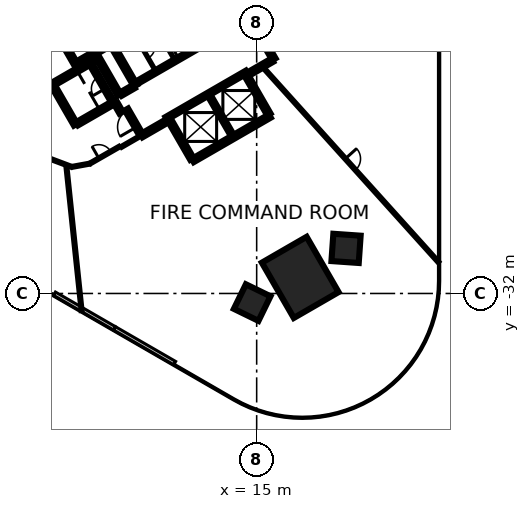
"""IFC4 building model, lengths in metres.
Left out: names, types, materials, properties, quantities, classifications, styles, units other than length and angle.
Written with IfcOpenShell. Run it as: python <this file> out.ifc"""

import sys

from ifc_helpers import new_model, si_unit, direction, frame, frame_2d, origin, origin_2d, place, context, subcontext, project, spatial, polyline, rectangle, outline, extrude, element, fill, save


model = new_model("IFC4")
c1 = context("Model", 3, precision=1e-05, world=origin(), true_north=direction((0.0, 1.0)))
c2 = subcontext(c1, "Body", "Model", "MODEL_VIEW")
j1 = project(units=[si_unit("LENGTHUNIT", "METRE"), si_unit("PLANEANGLEUNIT", "RADIAN")], contexts=[c1])
p1 = place(None, origin())
s1 = spatial("IfcSite", under=j1, at=p1, CompositionType="ELEMENT")
p2 = place(p1, origin())
s2 = spatial("IfcBuilding", under=s1, at=p2, CompositionType="ELEMENT")
p3 = place(p2, origin())
s3 = spatial("IfcBuildingStorey", under=s2, at=p3, CompositionType="ELEMENT", Elevation=0.0)
p4 = place(p3, frame((17.865, -30.942, -0.45), z_axis=(0.0, 0.0, 1.0), x_axis=(-0.5, 0.866025403784, 0.0)))
e1 = element("IfcColumn", 1, at=p4, inside=s3, PredefinedType="COLUMN", context=c2, shape_type="SweptSolid", body=[
    extrude(rectangle(XDim=4.2, YDim=3.4, at=origin_2d()), origin(), (0.0, 0.0, 1.0), 7.55),
])
for number, where, z_axis, x_axis in (
    (2, (20.879, -29.034, -0.45), (0.0, 0.0, 1.0), (-0.998, 0.07, 0.0)),
    (3, (14.705, -32.599, -0.45), (0.0, 0.0, 1.0), (0.438, 0.899, 0.0)),
):
    element("IfcColumn", number, at=place(p3, frame(where, z_axis=z_axis, x_axis=x_axis)), inside=s3, PredefinedType="COLUMN", context=c2, shape_type="SweptSolid", body=[
        extrude(rectangle(XDim=1.8, YDim=1.8, at=origin_2d()), origin(), (0.0, 0.0, 1.0), 5.15),
    ])
p5 = place(p3, frame((5.653, -34.297, 0.0), z_axis=(0.0, 0.0, 1.0), x_axis=(-0.866010176527, 0.500026373457, 0.0)))
e4 = element("IfcWall", 4, at=p5, inside=s3, PredefinedType="SOLIDWALL", context=c2, shape_type="SweptSolid", body=[
    extrude(rectangle(XDim=4.566, YDim=0.25, at=frame_2d((2.283, 0.0))), origin(), (0.0, 0.0, 1.0), 7.1),
])
p6 = place(p3, frame((9.608, -36.58, 0.0), z_axis=(0.0, 0.0, 1.0), x_axis=(-0.866023543838, 0.500003221507, 0.0)))
e5 = element("IfcWall", 5, at=p6, inside=s3, PredefinedType="SOLIDWALL", context=c2, shape_type="SweptSolid", body=[
    extrude(rectangle(XDim=4.566, YDim=0.25, at=frame_2d((2.283, 0.0))), origin(), (0.0, 0.0, 1.0), 7.1),
])
p7 = place(p3, origin())
e6 = element("IfcWall", 6, at=p7, inside=s3, PredefinedType="SOLIDWALL", context=c2, shape_type="SweptSolid", body=[
    extrude(outline(polyline([(13.5, -38.971), (14.556, -39.492), (15.671, -39.87), (16.244, -40.004), (17.411, -40.158), (18.589, -40.158), (19.175, -40.1), (20.329, -39.87), (21.444, -39.492), (22.5, -38.971), (23.0, -38.66), (23.479, -38.317), (24.364, -37.541), (25.14, -36.656), (25.483, -36.177), (26.072, -35.157), (26.522, -34.07), (26.827, -32.933), (26.981, -31.766), (27.0, -31.177), (26.75, -31.169), (26.731, -31.745), (26.581, -32.884), (26.285, -33.989), (25.847, -35.047), (25.273, -36.042), (24.944, -36.5), (24.187, -37.364), (23.323, -38.121), (22.861, -38.452), (22.378, -38.752), (21.348, -39.26), (20.265, -39.628), (19.138, -39.852), (18.576, -39.908), (17.428, -39.908), (16.289, -39.758), (15.739, -39.63), (14.652, -39.26), (13.611, -38.747), (13.5, -38.971)])), origin(), (0.0, 0.0, 1.0), 7.1),
])
p8 = place(p3, frame((13.008, -11.181, 0.0), z_axis=(0.0, 0.0, 1.0), x_axis=(0.500004234368, -0.866022959057, 0.0)))
e7 = element("IfcWall", 7, at=p8, inside=s3, PredefinedType="SHEAR", context=c2, shape_type="SweptSolid", body=[
    extrude(rectangle(XDim=6.25, YDim=0.25, at=frame_2d((3.125, 0.0))), origin(), (0.0, 0.0, 1.0), 7.1),
])
p9 = place(p3, frame((15.865, -20.328, 0.0), z_axis=(0.0, 0.0, 1.0), x_axis=(-0.86602852612, -0.499994591916, 0.0)))
e8 = element("IfcWall", 8, at=p9, inside=s3, PredefinedType="SHEAR", context=c2, shape_type="SweptSolid", body=[
    extrude(rectangle(XDim=5.85, YDim=0.25, at=frame_2d((2.925, 0.0))), origin(), (0.0, 0.0, 1.0), 7.1),
])
p10 = place(p3, frame((3.235, -17.153, 0.0), z_axis=(0.0, 0.0, 1.0), x_axis=(-0.500008851346, 0.866020293397, 0.0)))
e9 = element("IfcWall", 9, at=p10, inside=s3, PredefinedType="SHEAR", context=c2, shape_type="SweptSolid", body=[
    extrude(rectangle(XDim=5.51, YDim=0.25, at=frame_2d((2.755, 0.0))), origin(), (0.0, 0.0, 1.0), 7.1),
])
p11 = place(p3, frame((7.031, -18.327, 0.0), z_axis=(0.0, 0.0, 1.0), x_axis=(-0.499971222258, 0.866042017984, 0.0)))
e10 = element("IfcWall", 10, at=p11, inside=s3, PredefinedType="SHEAR", context=c2, shape_type="SweptSolid", body=[
    extrude(rectangle(XDim=3.2, YDim=0.25, at=frame_2d((1.6, 0.0))), origin(), (0.0, 0.0, 1.0), 7.1),
])
for number, where, z_axis, x_axis in (
    (11, (14.315, -17.644, 0.0), (0.0, 0.0, 1.0), (0.5, -0.866, 0.0)),
    (12, (10.736, -23.145, 0.0), (0.0, 0.0, 1.0), (-0.5, 0.866, 0.0)),
):
    element("IfcWall", number, at=place(p3, frame(where, z_axis=z_axis, x_axis=x_axis)), inside=s3, PredefinedType="SHEAR", context=c2, shape_type="SweptSolid", body=[
        extrude(rectangle(XDim=2.974, YDim=0.25, at=frame_2d((1.487, 0.0))), origin(), (0.0, 0.0, 1.0), 7.1),
    ])
p12 = place(p3, frame((3.085, -20.894, 0.0), z_axis=(0.0, 0.0, 1.0), x_axis=(-0.499978833458, 0.866037623948, 0.0)))
e13 = element("IfcWall", 13, at=p12, inside=s3, PredefinedType="SHEAR", context=c2, shape_type="SweptSolid", body=[
    extrude(rectangle(XDim=3.05, YDim=0.25, at=frame_2d((1.525, 0.0))), origin(), (0.0, 0.0, 1.0), 7.1),
])
p13 = place(p3, frame((1.669, -18.19, 0.0), z_axis=(0.0, 0.0, 1.0), x_axis=(0.866042235819, 0.499970844928, 0.0)))
e14 = element("IfcWall", 14, at=p13, inside=s3, PredefinedType="SHEAR", context=c2, shape_type="SweptSolid", body=[
    extrude(rectangle(XDim=2.865, YDim=0.25, at=frame_2d((1.432, 0.0))), origin(), (0.0, 0.0, 1.0), 7.1),
])
p14 = place(p3, frame((5.675, -19.399, 0.0), z_axis=(0.0, 0.0, 1.0), x_axis=(-0.866026637627, -0.499997862916, 0.0)))
e15 = element("IfcWall", 15, at=p14, inside=s3, PredefinedType="SHEAR", context=c2, shape_type="SweptSolid", body=[
    extrude(rectangle(XDim=2.865, YDim=0.25, at=frame_2d((1.432, 0.0))), origin(), (0.0, 0.0, 1.0), 7.1),
])
p15 = place(p3, frame((4.414, -16.276, 0.0), z_axis=(0.0, 0.0, 1.0), x_axis=(0.500003324108, -0.866023484601, 0.0)))
e16 = element("IfcWall", 16, at=p15, inside=s3, PredefinedType="SHEAR", context=c2, shape_type="SweptSolid", body=[
    extrude(rectangle(XDim=3.085, YDim=0.25, at=frame_2d((1.542, 0.0))), origin(), (0.0, 0.0, 1.0), 7.1),
])
p16 = place(p3, frame((5.322, -15.619, 0.0), z_axis=(0.0, 0.0, 1.0), x_axis=(-0.866026229868, -0.499998569178, 0.0)))
e17 = element("IfcWall", 17, at=p16, inside=s3, PredefinedType="SHEAR", context=c2, shape_type="SweptSolid", body=[
    extrude(rectangle(XDim=2.449, YDim=0.25, at=frame_2d((1.225, 0.0))), origin(), (0.0, 0.0, 1.0), 7.1),
])
p17 = place(p3, frame((9.14, -20.631, 0.0), z_axis=(0.0, 0.0, 1.0), x_axis=(-0.866043531843, -0.499968599967, 0.0)))
e18 = element("IfcWall", 18, at=p17, inside=s3, PredefinedType="SHEAR", context=c2, shape_type="SweptSolid", body=[
    extrude(rectangle(XDim=1.975, YDim=0.25, at=frame_2d((0.987, 0.0))), origin(), (0.0, 0.0, 1.0), 7.1),
])
p18 = place(p3, frame((16.025, -16.656, 0.0), z_axis=(0.0, 0.0, 1.0), x_axis=(-0.866016279763, -0.500015802937, 0.0)))
e19 = element("IfcWall", 19, at=p18, inside=s3, PredefinedType="SHEAR", context=c2, shape_type="SweptSolid", body=[
    extrude(rectangle(XDim=1.849, YDim=0.25, at=frame_2d((0.925, 0.0))), origin(), (0.0, 0.0, 1.0), 7.1),
])
p19 = place(p3, frame((7.367, -21.51, 0.0), z_axis=(0.0, 0.0, 1.0), x_axis=(-0.499983108224, 0.866035156036, 0.0)))
e20 = element("IfcWall", 20, at=p19, inside=s3, PredefinedType="SHEAR", context=c2, shape_type="SweptSolid", body=[
    extrude(rectangle(XDim=1.865, YDim=0.25, at=frame_2d((0.932, 0.0))), origin(), (0.0, 0.0, 1.0), 7.1),
])
p20 = place(p19, frame((0.535, 0.0, 0.0)))
e21 = element("IfcOpeningElement", 21, at=p20, cuts=e20, PredefinedType="OPENING", context=c2, shape_type="SweptSolid", body=[
    extrude(rectangle(XDim=1.25, YDim=2.1, at=frame_2d((0.625, 1.05))), frame((0.0, 0.135, 0.0), z_axis=(0.0, -1.0, 0.0), x_axis=(1.0, 0.0, 0.0)), (0.0, 0.0, 1.0), 0.27),
])
p21 = place(p3, frame((6.065, -18.885, 0.0), z_axis=(0.0, 0.0, 1.0), x_axis=(0.866017078145, 0.500014420154, 0.0)))
e22 = element("IfcWall", 22, at=p21, inside=s3, PredefinedType="SHEAR", context=c2, shape_type="SweptSolid", body=[
    extrude(rectangle(XDim=0.989, YDim=0.25, at=frame_2d((0.495, 0.0))), origin(), (0.0, 0.0, 1.0), 7.1),
])
p22 = place(p3, frame((6.08, -20.1, 0.0), z_axis=(0.0, 0.0, 1.0), x_axis=(-0.500051773299, 0.865995510393, 0.0)))
e23 = element("IfcWall", 23, at=p22, inside=s3, PredefinedType="SHEAR", context=c2, shape_type="SweptSolid", body=[
    extrude(rectangle(XDim=0.685, YDim=0.25, at=frame_2d((0.342, 0.0))), origin(), (0.0, 0.0, 1.0), 7.1),
])
p23 = place(p3, frame((4.145, -16.749, 0.0), z_axis=(0.0, 0.0, 1.0), x_axis=(0.866185586049, 0.49972245349, 0.0)))
e24 = element("IfcWall", 24, at=p23, inside=s3, PredefinedType="SHEAR", context=c2, shape_type="SweptSolid", body=[
    extrude(rectangle(XDim=0.344, YDim=0.25, at=frame_2d((0.172, 0.0))), origin(), (0.0, 0.0, 1.0), 7.1),
])
p24 = place(p3, frame((9.052, -20.48, 0.0), z_axis=(0.0, 0.0, 1.0), x_axis=(0.866030299012, 0.499991521122, 0.0)))
e25 = element("IfcWall", 25, at=p24, inside=s3, PredefinedType="SHEAR", context=c2, shape_type="SweptSolid", body=[
    extrude(rectangle(XDim=6.1, YDim=0.2, at=frame_2d((3.05, 0.0))), origin(), (0.0, 0.0, 1.0), 7.1),
])
p25 = place(p24, frame((1.0, 0.0, 0.0)))
e26 = element("IfcOpeningElement", 26, at=p25, cuts=e25, PredefinedType="OPENING", context=c2, shape_type="SweptSolid", body=[
    extrude(rectangle(XDim=1.2, YDim=2.1, at=frame_2d((0.6, 1.05))), frame((0.0, 0.11, 0.0), z_axis=(0.0, -1.0, 0.0), x_axis=(1.0, 0.0, 0.0)), (0.0, 0.0, 1.0), 0.22),
])
p26 = place(p24, frame((4.05, 0.0, 0.0)))
e27 = element("IfcOpeningElement", 27, at=p26, cuts=e25, PredefinedType="OPENING", context=c2, shape_type="SweptSolid", body=[
    extrude(rectangle(XDim=1.2, YDim=2.1, at=frame_2d((0.6, 1.05))), frame((0.0, 0.11, 0.0), z_axis=(0.0, -1.0, 0.0), x_axis=(1.0, 0.0, 0.0)), (0.0, 0.0, 1.0), 0.22),
])
p27 = place(p3, frame((7.077, -18.156, 0.0), z_axis=(0.0, 0.0, 1.0), x_axis=(0.866038630372, 0.499977090179, 0.0)))
e28 = element("IfcWall", 28, at=p27, inside=s3, PredefinedType="SHEAR", context=c2, shape_type="SweptSolid", body=[
    extrude(rectangle(XDim=5.699, YDim=0.2, at=frame_2d((2.85, 0.0))), origin(), (0.0, 0.0, 1.0), 7.1),
])
p28 = place(p27, frame((3.224, 0.0, 0.0)))
e29 = element("IfcOpeningElement", 29, at=p28, cuts=e28, PredefinedType="OPENING", context=c2, shape_type="SweptSolid", body=[
    extrude(rectangle(XDim=0.9, YDim=2.1, at=frame_2d((0.45, 1.05))), frame((0.0, 0.11, 0.0), z_axis=(0.0, -1.0, 0.0), x_axis=(1.0, 0.0, 0.0)), (0.0, 0.0, 1.0), 0.22),
])
p29 = place(p27, frame((4.599, 0.0, 0.0)))
e30 = element("IfcOpeningElement", 30, at=p29, cuts=e28, PredefinedType="OPENING", context=c2, shape_type="SweptSolid", body=[
    extrude(rectangle(XDim=0.9, YDim=2.1, at=frame_2d((0.45, 1.05))), frame((0.0, 0.11, 0.0), z_axis=(0.0, -1.0, 0.0), x_axis=(1.0, 0.0, 0.0)), (0.0, 0.0, 1.0), 0.22),
])
p30 = place(p3, frame((11.875, -18.967, 0.0), z_axis=(0.0, 0.0, 1.0), x_axis=(0.49998131003, -0.866036194175, 0.0)))
e31 = element("IfcWall", 31, at=p30, inside=s3, PredefinedType="SHEAR", context=c2, shape_type="SweptSolid", body=[
    extrude(rectangle(XDim=3.048, YDim=0.2, at=frame_2d((1.524, 0.0))), origin(), (0.0, 0.0, 1.0), 7.1),
])
p31 = place(p3, frame((5.503, -19.352, 0.0), z_axis=(0.0, 0.0, 1.0), x_axis=(-0.499986818241, 0.866033014143, 0.0)))
e32 = element("IfcWall", 32, at=p31, inside=s3, PredefinedType="SHEAR", context=c2, shape_type="SweptSolid", body=[
    extrude(rectangle(XDim=2.798, YDim=0.2, at=frame_2d((1.399, 0.0))), origin(), (0.0, 0.0, 1.0), 7.1),
])
p32 = place(p31, frame((0.949, 0.0, 0.0)))
e33 = element("IfcOpeningElement", 33, at=p32, cuts=e32, PredefinedType="OPENING", context=c2, shape_type="SweptSolid", body=[
    extrude(rectangle(XDim=0.9, YDim=2.1, at=frame_2d((0.45, 1.05))), frame((0.0, 0.11, 0.0), z_axis=(0.0, -1.0, 0.0), x_axis=(1.0, 0.0, 0.0)), (0.0, 0.0, 1.0), 0.22),
])
p33 = place(p3, frame((8.207, -14.214, 0.0), z_axis=(0.0, 0.0, 1.0), x_axis=(0.50002746344, -0.86600954718, 0.0)))
e34 = element("IfcWall", 34, at=p33, inside=s3, PredefinedType="PARTITIONING", context=c2, shape_type="SweptSolid", body=[
    extrude(rectangle(XDim=2.748, YDim=0.15, at=frame_2d((1.374, 0.0))), origin(), (0.0, 0.0, 1.0), 7.1),
])
p34 = place(p33, frame((0.924, 0.0, 0.0)))
e35 = element("IfcOpeningElement", 35, at=p34, cuts=e34, PredefinedType="OPENING", context=c2, shape_type="SweptSolid", body=[
    extrude(rectangle(XDim=0.9, YDim=2.1, at=frame_2d((0.45, 1.05))), frame((0.0, 0.085, 0.0), z_axis=(0.0, -1.0, 0.0), x_axis=(1.0, 0.0, 0.0)), (0.0, 0.0, 1.0), 0.17),
])
p35 = place(p3, frame((6.951, -14.939, 0.0), z_axis=(0.0, 0.0, 1.0), x_axis=(0.499988999718, -0.866031754707, 0.0)))
e36 = element("IfcWall", 36, at=p35, inside=s3, PredefinedType="PARTITIONING", context=c2, shape_type="SweptSolid", body=[
    extrude(rectangle(XDim=2.749, YDim=0.15, at=frame_2d((1.374, 0.0))), origin(), (0.0, 0.0, 1.0), 7.1),
])
p36 = place(p35, frame((0.924, 0.0, 0.0)))
e37 = element("IfcOpeningElement", 37, at=p36, cuts=e36, PredefinedType="OPENING", context=c2, shape_type="SweptSolid", body=[
    extrude(rectangle(XDim=0.9, YDim=2.1, at=frame_2d((0.45, 1.05))), frame((0.0, 0.085, 0.0), z_axis=(0.0, -1.0, 0.0), x_axis=(1.0, 0.0, 0.0)), (0.0, 0.0, 1.0), 0.17),
])
p37 = place(p3, frame((1.391, -23.133, 0.0), z_axis=(0.0, 0.0, 1.0), x_axis=(0.936212023637, -0.351435693688, 0.0)))
e38 = element("IfcWall", 38, at=p37, inside=s3, PredefinedType="PARTITIONING", context=c2, shape_type="SweptSolid", body=[
    extrude(rectangle(XDim=1.542, YDim=0.2, at=frame_2d((0.771, 0.0))), origin(), (0.0, 0.0, 1.0), 7.1),
])
p38 = place(p3, frame((2.474, -23.543, 0.0), z_axis=(0.0, 0.0, 1.0), x_axis=(0.10461532009, -0.994512762514, 0.0)))
e39 = element("IfcWall", 39, at=p38, inside=s3, PredefinedType="PARTITIONING", context=c2, shape_type="SweptSolid", body=[
    extrude(rectangle(XDim=9.697, YDim=0.2, at=frame_2d((4.848, 0.0))), origin(), (0.0, 0.0, 1.0), 4.7),
])
p39 = place(p3, frame((2.838, -23.675, 0.0), z_axis=(0.0, 0.0, 1.0), x_axis=(0.983748481543, 0.179552012136, 0.0)))
e40 = element("IfcWall", 40, at=p39, inside=s3, PredefinedType="PARTITIONING", context=c2, shape_type="SweptSolid", body=[
    extrude(rectangle(XDim=1.192, YDim=0.2, at=frame_2d((0.596, 0.0))), origin(), (0.0, 0.0, 1.0), 7.1),
])
p40 = place(p3, frame((4.022, -23.458, 0.0), z_axis=(0.0, 0.0, 1.0), x_axis=(0.867379634497, 0.497647033208, 0.0)))
e41 = element("IfcWall", 41, at=p40, inside=s3, PredefinedType="PARTITIONING", context=c2, shape_type="SweptSolid", body=[
    extrude(rectangle(XDim=2.283, YDim=0.2, at=frame_2d((1.141, 0.0))), origin(), (0.0, 0.0, 1.0), 7.1),
])
p41 = place(p40, frame((0.691, 0.0, 0.0)))
e42 = element("IfcOpeningElement", 42, at=p41, cuts=e41, PredefinedType="OPENING", context=c2, shape_type="SweptSolid", body=[
    extrude(rectangle(XDim=0.9, YDim=2.1, at=frame_2d((0.45, 1.05))), frame((0.0, 0.11, 0.0), z_axis=(0.0, -1.0, 0.0), x_axis=(1.0, 0.0, 0.0)), (0.0, 0.0, 1.0), 0.22),
])
p42 = place(p3, frame((6.059, -22.383, 0.0), z_axis=(0.0, 0.0, 1.0), x_axis=(0.866009351323, 0.500027802648, 0.0)))
e43 = element("IfcWall", 43, at=p42, inside=s3, PredefinedType="PARTITIONING", context=c2, shape_type="SweptSolid", body=[
    extrude(rectangle(XDim=1.384, YDim=0.2, at=frame_2d((0.692, 0.0))), origin(), (0.0, 0.0, 1.0), 7.1),
])
p43 = place(p3, frame((15.475, -17.188, 0.0), z_axis=(0.0, 0.0, 1.0), x_axis=(0.669166821611, -0.74311221552, 0.0)))
e44 = element("IfcWall", 44, at=p43, inside=s3, PredefinedType="PARTITIONING", context=c2, shape_type="SweptSolid", body=[
    extrude(rectangle(XDim=17.218, YDim=0.2, at=frame_2d((8.609, 0.0))), origin(), (0.0, 0.0, 1.0), 4.7),
])
p44 = place(p43, frame((8.006, 0.0, 0.0)))
e45 = element("IfcOpeningElement", 45, at=p44, cuts=e44, PredefinedType="OPENING", context=c2, shape_type="SweptSolid", body=[
    extrude(rectangle(XDim=1.0, YDim=2.1, at=frame_2d((0.5, 1.05))), frame((0.0, 0.11, 0.0), z_axis=(0.0, -1.0, 0.0), x_axis=(1.0, 0.0, 0.0)), (0.0, 0.0, 1.0), 0.22),
])
p45 = place(p25, origin())
e46 = element("IfcDoor", 46, at=p45, inside=s3, OperationType="DOUBLE_DOOR_SLIDING", PredefinedType="DOOR", context=c2, shape_type="SweptSolid", body=[
    extrude(rectangle(XDim=1.2, YDim=2.1, at=frame_2d((0.6, 1.05))), frame((0.0, 0.025, 0.0), z_axis=(0.0, -1.0, 0.0), x_axis=(1.0, 0.0, 0.0)), (0.0, 0.0, 1.0), 0.05),
])
fill(e26, e46)
p46 = place(p26, origin())
e47 = element("IfcDoor", 47, at=p46, inside=s3, OperationType="DOUBLE_DOOR_SLIDING", PredefinedType="DOOR", context=c2, shape_type="SweptSolid", body=[
    extrude(rectangle(XDim=1.2, YDim=2.1, at=frame_2d((0.6, 1.05))), frame((0.0, 0.025, 0.0), z_axis=(0.0, -1.0, 0.0), x_axis=(1.0, 0.0, 0.0)), (0.0, 0.0, 1.0), 0.05),
])
fill(e27, e47)
p47 = place(p20, origin())
e48 = element("IfcDoor", 48, at=p47, inside=s3, OperationType="SINGLE_SWING_LEFT", PredefinedType="DOOR", context=c2, shape_type="SweptSolid", body=[
    extrude(rectangle(XDim=1.25, YDim=2.1, at=frame_2d((0.625, 1.05))), frame((0.0, 0.025, 0.0), z_axis=(0.0, -1.0, 0.0), x_axis=(1.0, 0.0, 0.0)), (0.0, 0.0, 1.0), 0.05),
])
fill(e21, e48)
p48 = place(p28, origin())
e49 = element("IfcDoor", 49, at=p48, inside=s3, OperationType="SINGLE_SWING_LEFT", PredefinedType="DOOR", context=c2, shape_type="SweptSolid", body=[
    extrude(rectangle(XDim=0.9, YDim=2.1, at=frame_2d((0.45, 1.05))), frame((0.0, 0.025, 0.0), z_axis=(0.0, -1.0, 0.0), x_axis=(1.0, 0.0, 0.0)), (0.0, 0.0, 1.0), 0.05),
])
fill(e29, e49)
p49 = place(p32, origin())
e50 = element("IfcDoor", 50, at=p49, inside=s3, OperationType="SINGLE_SWING_LEFT", PredefinedType="DOOR", context=c2, shape_type="SweptSolid", body=[
    extrude(rectangle(XDim=0.9, YDim=2.1, at=frame_2d((0.45, 1.05))), frame((0.0, 0.025, 0.0), z_axis=(0.0, -1.0, 0.0), x_axis=(1.0, 0.0, 0.0)), (0.0, 0.0, 1.0), 0.05),
])
fill(e33, e50)
p50 = place(p36, origin())
e51 = element("IfcDoor", 51, at=p50, inside=s3, OperationType="SINGLE_SWING_LEFT", PredefinedType="DOOR", context=c2, shape_type="SweptSolid", body=[
    extrude(rectangle(XDim=0.9, YDim=2.1, at=frame_2d((0.45, 1.05))), frame((0.0, 0.025, 0.0), z_axis=(0.0, -1.0, 0.0), x_axis=(1.0, 0.0, 0.0)), (0.0, 0.0, 1.0), 0.05),
])
fill(e37, e51)
p51 = place(p41, frame((0.9, 0.0, 0.0), z_axis=(0.0, 0.0, 1.0), x_axis=(-1.0, 0.0, 0.0)))
e52 = element("IfcDoor", 52, at=p51, inside=s3, OperationType="SINGLE_SWING_LEFT", PredefinedType="DOOR", context=c2, shape_type="SweptSolid", body=[
    extrude(rectangle(XDim=0.9, YDim=2.1, at=frame_2d((0.45, 1.05))), frame((0.0, 0.025, 0.0), z_axis=(0.0, -1.0, 0.0), x_axis=(1.0, 0.0, 0.0)), (0.0, 0.0, 1.0), 0.05),
])
fill(e42, e52)
p52 = place(p44, origin())
e53 = element("IfcDoor", 53, at=p52, inside=s3, OperationType="SINGLE_SWING_LEFT", PredefinedType="DOOR", context=c2, shape_type="SweptSolid", body=[
    extrude(rectangle(XDim=1.0, YDim=2.1, at=frame_2d((0.5, 1.05))), frame((0.0, 0.025, 0.0), z_axis=(0.0, -1.0, 0.0), x_axis=(1.0, 0.0, 0.0)), (0.0, 0.0, 1.0), 0.05),
])
fill(e45, e53)
save(model, sys.argv[1])
